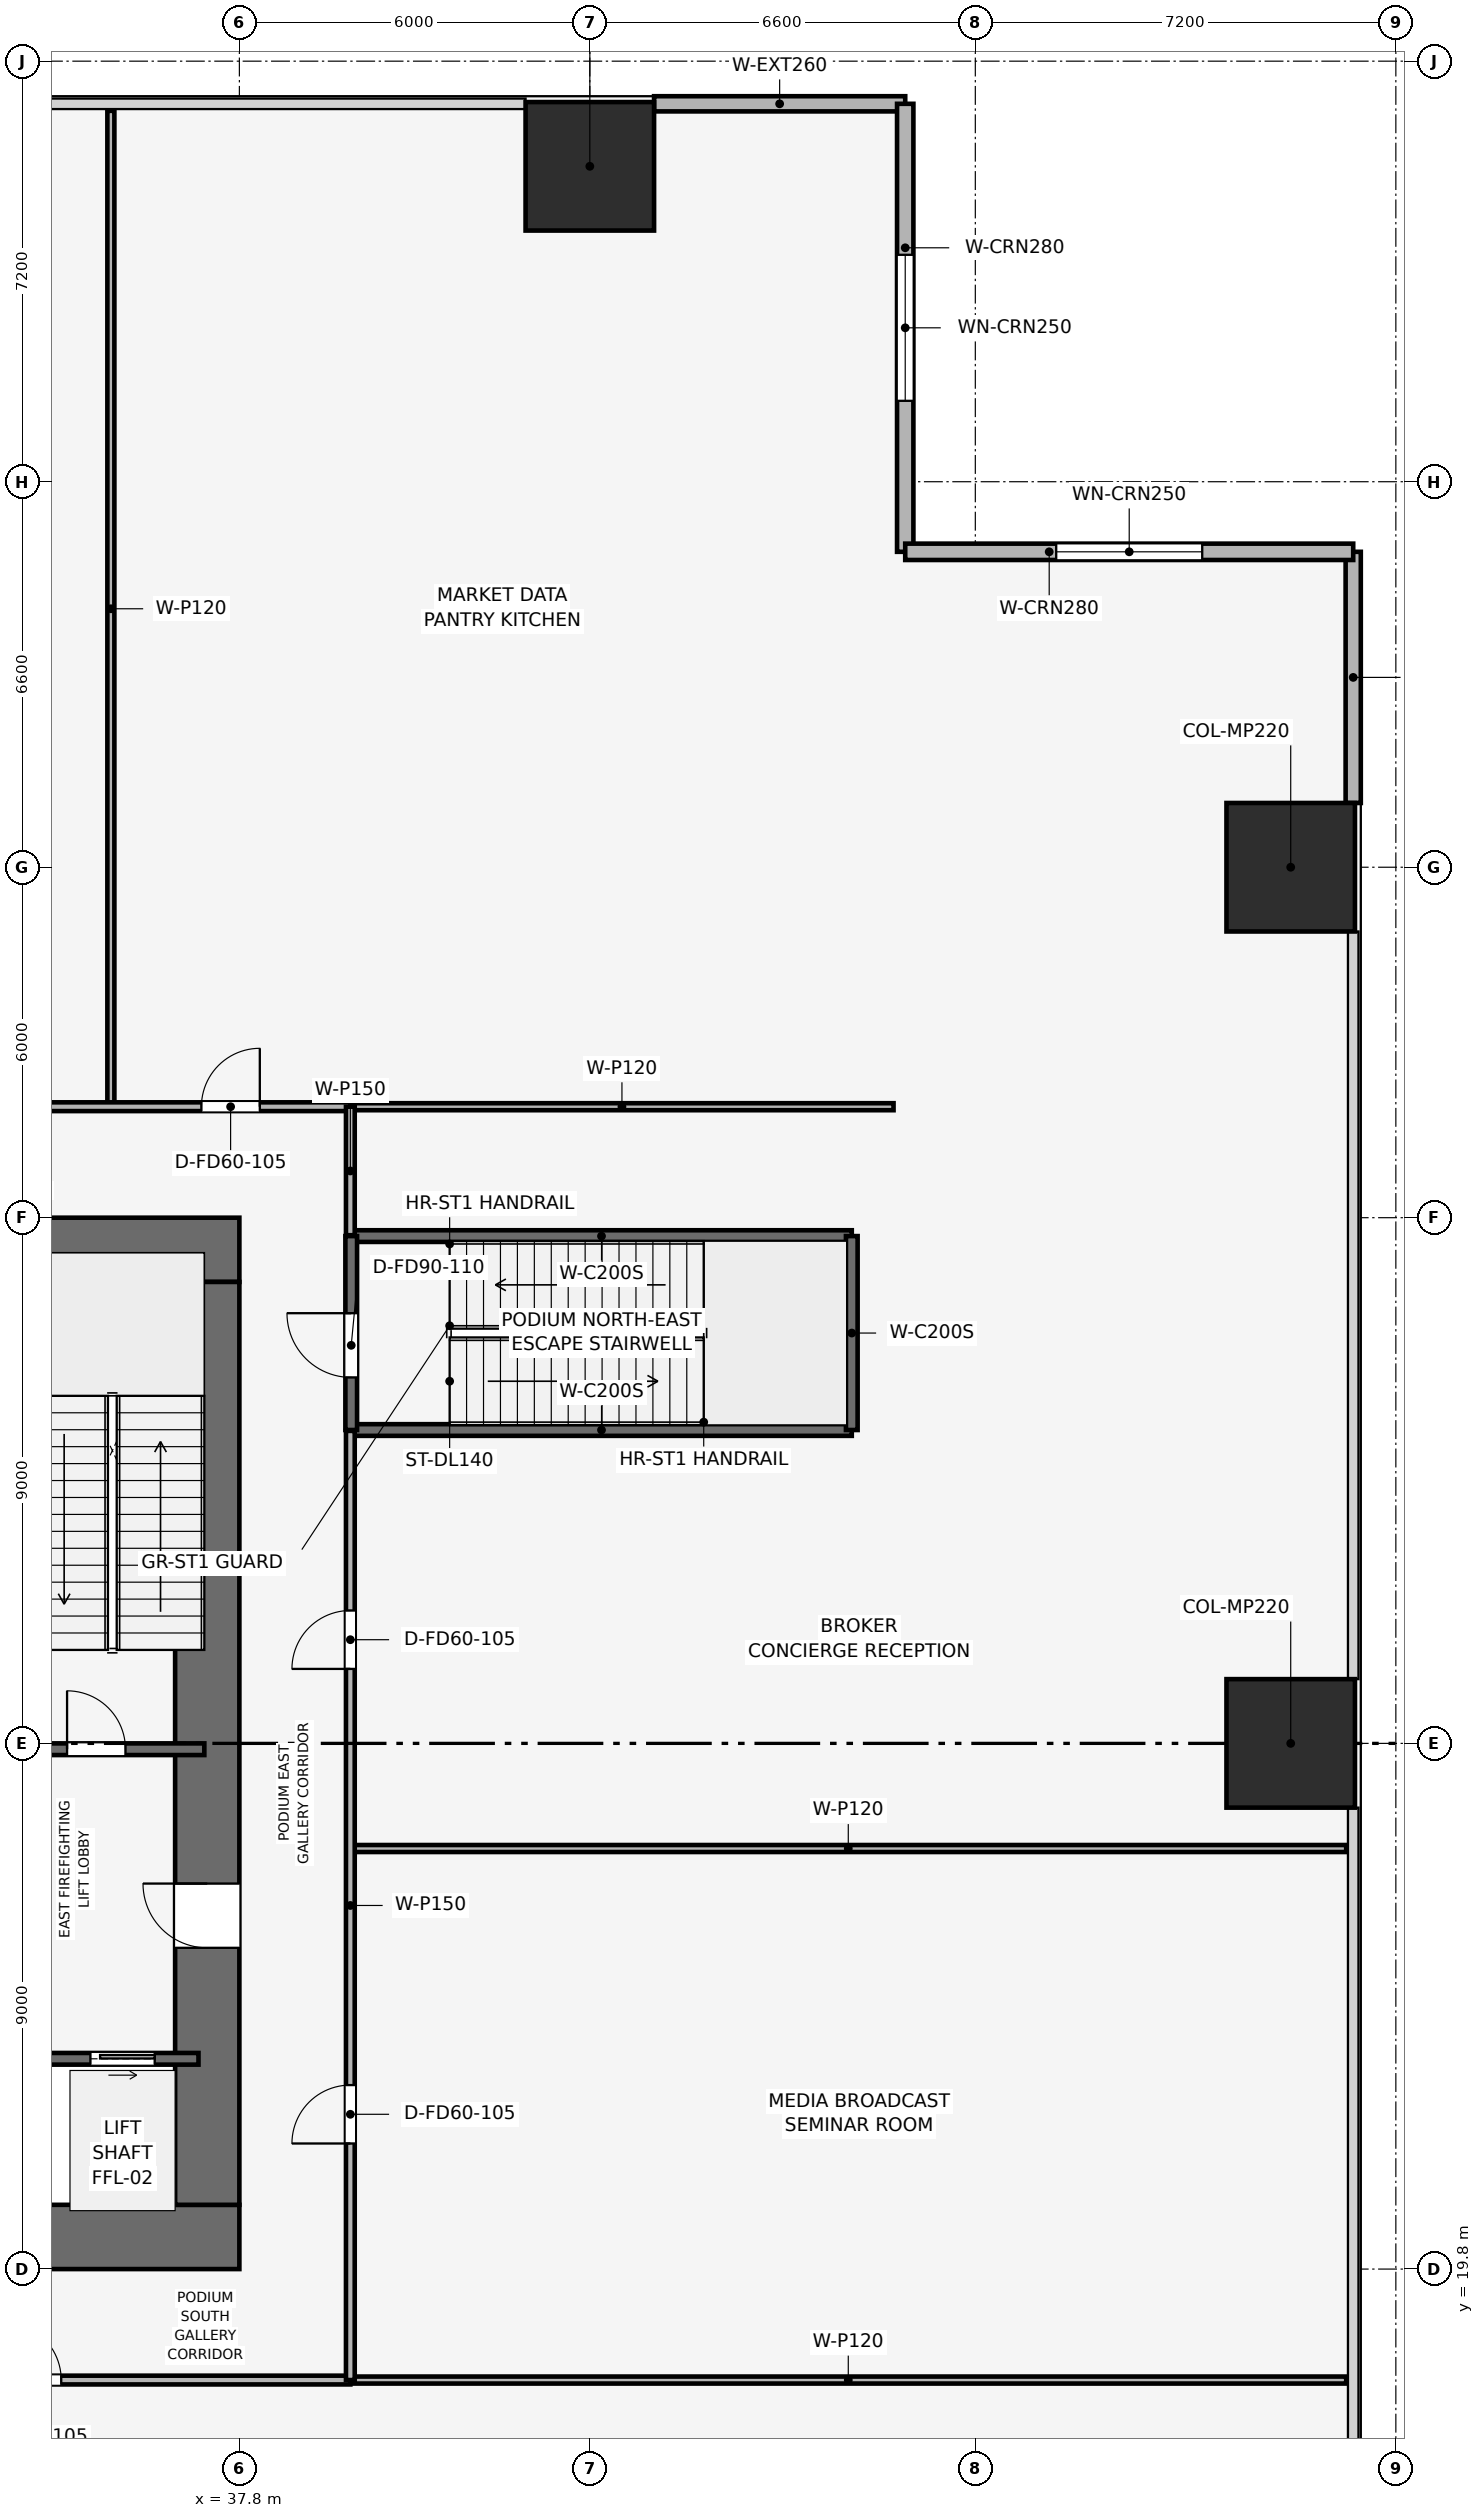
"""IFC4 building model, lengths in metres.
Left out: names, types, materials, properties, quantities, classifications, styles, units other than length and angle.
Written with IfcOpenShell. Run it as: python <this file> out.ifc"""

import sys

from ifc_helpers import new_model, si_unit, direction, frame, frame_2d, origin, origin_2d, place, context, subcontext, project, spatial, rectangle, extrude, element, fill, save


model = new_model("IFC4")
c1 = context("Model", 3, precision=1e-05, world=origin(), true_north=direction((0.0, 1.0)))
c2 = subcontext(c1, "Body", "Model", "MODEL_VIEW")
j1 = project(units=[si_unit("LENGTHUNIT", "METRE"), si_unit("PLANEANGLEUNIT", "RADIAN")], contexts=[c1])
p1 = place(None, origin())
s1 = spatial("IfcSite", under=j1, at=p1, CompositionType="ELEMENT")
p2 = place(p1, origin())
s2 = spatial("IfcBuilding", under=s1, at=p2, CompositionType="ELEMENT")
p3 = place(p2, frame((0.0, 0.0, 8.4)))
s3 = spatial("IfcBuildingStorey", under=s2, at=p3, CompositionType="ELEMENT", Elevation=8.4)
p4 = place(p3, frame((19.8, 20.35, 0.0), z_axis=(0.0, 0.0, 1.0), x_axis=(1.0, 0.0, 0.0)))
e1 = element("IfcWall", 1, at=p4, inside=s3, PredefinedType="SHEAR", context=c2, shape_type="SweptSolid", body=[
    extrude(rectangle(XDim=18.0, YDim=1.1, at=frame_2d((9.0, 0.0))), origin(), (0.0, 0.0, 1.0), 5.4),
])
p5 = place(p4, frame((8.4, 0.0, 0.0)))
e2 = element("IfcOpeningElement", 2, at=p5, cuts=e1, PredefinedType="OPENING", context=c2, shape_type="SweptSolid", body=[
    extrude(rectangle(XDim=1.2, YDim=2.2, at=frame_2d((0.6, 1.1))), frame((0.0, 0.56, 0.0), z_axis=(0.0, -1.0, 0.0), x_axis=(1.0, 0.0, 0.0)), (0.0, 0.0, 1.0), 1.12),
])
p6 = place(p3, frame((19.8, 37.25, 0.0), z_axis=(0.0, 0.0, 1.0), x_axis=(1.0, 0.0, 0.0)))
e3 = element("IfcWall", 3, at=p6, inside=s3, PredefinedType="SHEAR", context=c2, shape_type="SweptSolid", body=[
    extrude(rectangle(XDim=18.0, YDim=1.1, at=frame_2d((9.0, 0.0))), origin(), (0.0, 0.0, 1.0), 5.4),
])
p7 = place(p6, frame((7.05, 0.0, 0.0)))
e4 = element("IfcOpeningElement", 4, at=p7, cuts=e3, PredefinedType="OPENING", context=c2, shape_type="SweptSolid", body=[
    extrude(rectangle(XDim=1.1, YDim=2.15, at=frame_2d((0.55, 1.075))), frame((0.0, 0.56, 0.0), z_axis=(0.0, -1.0, 0.0), x_axis=(1.0, 0.0, 0.0)), (0.0, 0.0, 1.0), 1.12),
])
p8 = place(p3, frame((37.25, 20.9, 0.0), z_axis=(0.0, 0.0, 1.0), x_axis=(0.0, 1.0, 0.0)))
e5 = element("IfcWall", 5, at=p8, inside=s3, PredefinedType="SHEAR", context=c2, shape_type="SweptSolid", body=[
    extrude(rectangle(XDim=15.8, YDim=1.1, at=frame_2d((7.9, 0.0))), origin(), (0.0, 0.0, 1.0), 5.4),
])
p9 = place(p8, frame((4.4, 0.0, 0.0)))
e6 = element("IfcOpeningElement", 6, at=p9, cuts=e5, PredefinedType="OPENING", context=c2, shape_type="SweptSolid", body=[
    extrude(rectangle(XDim=1.1, YDim=2.15, at=frame_2d((0.55, 1.075))), frame((0.0, 0.56, 0.0), z_axis=(0.0, -1.0, 0.0), x_axis=(1.0, 0.0, 0.0)), (0.0, 0.0, 1.0), 1.12),
])
for number, where, z_axis, x_axis in (
    (7, (55.8, 28.8, 0.002), (0.0, 0.0, 1.0), (1.0, 0.0, 0.0)),
    (8, (55.8, 43.8, 0.002), (0.0, 0.0, 1.0), (1.0, 0.0, 0.0)),
    (9, (43.8, 55.8, 0.002), (0.0, 0.0, 1.0), (1.0, 0.0, 0.0)),
):
    element("IfcColumn", number, at=place(p3, frame(where, z_axis=z_axis, x_axis=x_axis)), inside=s3, PredefinedType="PILASTER", context=c2, shape_type="SweptSolid", body=[
        extrude(rectangle(XDim=2.2, YDim=2.2, at=origin_2d()), origin(), (0.0, 0.0, 1.0), 5.396),
    ])
for number, where, z_axis, x_axis in (
    (10, (44.9, 56.87, 0.0), (0.0, 0.0, 1.0), (1.0, 0.0, 0.0)),
    (11, (56.87, 49.2, 0.0), (0.0, 0.0, 1.0), (0.0, -1.0, 0.0)),
):
    element("IfcWall", number, at=place(p3, frame(where, z_axis=z_axis, x_axis=x_axis)), inside=s3, PredefinedType="SOLIDWALL", context=c2, shape_type="SweptSolid", body=[
        extrude(rectangle(XDim=4.3, YDim=0.26, at=frame_2d((2.15, 0.0))), origin(), (0.0, 0.0, 1.0), 5.05),
    ])
p10 = place(p3, frame((49.2, 56.87, 0.0), z_axis=(0.0, 0.0, 1.0), x_axis=(0.0, -1.0, 0.0)))
e12 = element("IfcWall", 12, at=p10, inside=s3, PredefinedType="SOLIDWALL", context=c2, shape_type="SweptSolid", body=[
    extrude(rectangle(XDim=7.67, YDim=0.28, at=frame_2d((3.835, 0.0))), origin(), (0.0, 0.0, 1.0), 5.05),
])
p11 = place(p10, frame((2.585, 0.0, 0.9)))
e13 = element("IfcOpeningElement", 13, at=p11, cuts=e12, PredefinedType="OPENING", context=c2, shape_type="SweptSolid", body=[
    extrude(rectangle(XDim=2.5, YDim=1.9, at=frame_2d((1.25, 0.95))), frame((0.0, 0.15, 0.0), z_axis=(0.0, -1.0, 0.0), x_axis=(1.0, 0.0, 0.0)), (0.0, 0.0, 1.0), 0.3),
])
p12 = place(p3, frame((49.2, 49.2, 0.0), z_axis=(0.0, 0.0, 1.0), x_axis=(1.0, 0.0, 0.0)))
e14 = element("IfcWall", 14, at=p12, inside=s3, PredefinedType="SOLIDWALL", context=c2, shape_type="SweptSolid", body=[
    extrude(rectangle(XDim=7.67, YDim=0.28, at=frame_2d((3.835, 0.0))), origin(), (0.0, 0.0, 1.0), 5.05),
])
p13 = place(p12, frame((2.585, 0.0, 0.9)))
e15 = element("IfcOpeningElement", 15, at=p13, cuts=e14, PredefinedType="OPENING", context=c2, shape_type="SweptSolid", body=[
    extrude(rectangle(XDim=2.5, YDim=1.9, at=frame_2d((1.25, 0.95))), frame((0.0, 0.15, 0.0), z_axis=(0.0, -1.0, 0.0), x_axis=(1.0, 0.0, 0.0)), (0.0, 0.0, 1.0), 0.3),
])
p14 = place(p3, frame((34.05, 28.7, 0.0), z_axis=(0.0, 0.0, 1.0), x_axis=(1.0, 0.0, 0.0)))
e16 = element("IfcWall", 16, at=p14, inside=s3, PredefinedType="SHEAR", context=c2, shape_type="SweptSolid", body=[
    extrude(rectangle(XDim=3.15, YDim=0.2, at=frame_2d((1.575, 0.0))), origin(), (0.0, 0.0, 1.0), 5.05),
])
p15 = place(p14, frame((0.8, 0.0, 0.0)))
e17 = element("IfcOpeningElement", 17, at=p15, cuts=e16, PredefinedType="OPENING", context=c2, shape_type="SweptSolid", body=[
    extrude(rectangle(XDim=1.0, YDim=2.1, at=frame_2d((0.5, 1.05))), frame((0.0, 0.11, 0.0), z_axis=(0.0, -1.0, 0.0), x_axis=(1.0, 0.0, 0.0)), (0.0, 0.0, 1.0), 0.22),
])
p16 = place(p3, frame((34.05, 23.4, 0.0), z_axis=(0.0, 0.0, 1.0), x_axis=(1.0, 0.0, 0.0)))
e18 = element("IfcWall", 18, at=p16, inside=s3, PredefinedType="SHEAR", context=c2, shape_type="SweptSolid", body=[
    extrude(rectangle(XDim=3.05, YDim=0.2, at=frame_2d((1.525, 0.0))), origin(), (0.0, 0.0, 1.0), 5.05),
])
p17 = place(p16, frame((1.2, 0.0, 0.0)))
e19 = element("IfcOpeningElement", 19, at=p17, cuts=e18, PredefinedType="OPENING", context=c2, shape_type="SweptSolid", body=[
    extrude(rectangle(XDim=1.1, YDim=2.15, at=frame_2d((0.55, 1.075))), frame((0.0, 0.11, 0.0), z_axis=(0.0, -1.0, 0.0), x_axis=(1.0, 0.0, 0.0)), (0.0, 0.0, 1.0), 0.22),
])
for number, where, z_axis, x_axis in (
    (20, (39.715, 34.165, 0.0), (0.0, 0.0, 1.0), (1.0, 0.0, 0.0)),
    (21, (39.715, 37.485, 0.0), (0.0, 0.0, 1.0), (1.0, 0.0, 0.0)),
):
    element("IfcWall", number, at=place(p3, frame(where, z_axis=z_axis, x_axis=x_axis)), inside=s3, PredefinedType="SHEAR", context=c2, shape_type="SweptSolid", body=[
        extrude(rectangle(XDim=8.57, YDim=0.2, at=frame_2d((4.285, 0.0))), origin(), (0.0, 0.0, 1.0), 5.398),
    ])
p18 = place(p3, frame((48.285, 34.165, 0.0), z_axis=(0.0, 0.0, 1.0), x_axis=(0.0, 1.0, 0.0)))
e22 = element("IfcWall", 22, at=p18, inside=s3, PredefinedType="SHEAR", context=c2, shape_type="SweptSolid", body=[
    extrude(rectangle(XDim=3.32, YDim=0.2, at=frame_2d((1.66, 0.0))), origin(), (0.0, 0.0, 1.0), 5.398),
])
p19 = place(p3, frame((39.715, 34.165, 0.0), z_axis=(0.0, 0.0, 1.0), x_axis=(0.0, 1.0, 0.0)))
e23 = element("IfcWall", 23, at=p19, inside=s3, PredefinedType="SHEAR", context=c2, shape_type="SweptSolid", body=[
    extrude(rectangle(XDim=3.32, YDim=0.2, at=frame_2d((1.66, 0.0))), origin(), (0.0, 0.0, 1.0), 5.398),
])
p20 = place(p19, frame((0.9, 0.0, 0.0)))
e24 = element("IfcOpeningElement", 24, at=p20, cuts=e23, PredefinedType="OPENING", context=c2, shape_type="SweptSolid", body=[
    extrude(rectangle(XDim=1.1, YDim=2.15, at=frame_2d((0.55, 1.075))), frame((0.0, 0.11, 0.0), z_axis=(0.0, -1.0, 0.0), x_axis=(1.0, 0.0, 0.0)), (0.0, 0.0, 1.0), 0.22),
])
for number, where, z_axis, x_axis in (
    (25, (35.6, 39.7, 0.0), (0.0, 0.0, 1.0), (0.0, 1.0, 0.0)),
    (26, (39.7, 27.0, 0.0), (0.0, 0.0, 1.0), (1.0, 0.0, 0.0)),
    (27, (39.7, 17.9, 0.0), (0.0, 0.0, 1.0), (1.0, 0.0, 0.0)),
):
    element("IfcWall", number, at=place(p3, frame(where, z_axis=z_axis, x_axis=x_axis)), inside=s3, PredefinedType="PARTITIONING", context=c2, shape_type="SweptSolid", body=[
        extrude(rectangle(XDim=17.05, YDim=0.12, at=frame_2d((8.525, 0.0))), origin(), (0.0, 0.0, 1.0), 4.035),
    ])
p21 = place(p3, frame((39.7, 39.7, 0.0), z_axis=(0.0, 0.0, 1.0), x_axis=(1.0, 0.0, 0.0)))
e28 = element("IfcWall", 28, at=p21, inside=s3, PredefinedType="PARTITIONING", context=c2, shape_type="SweptSolid", body=[
    extrude(rectangle(XDim=9.3, YDim=0.12, at=frame_2d((4.65, 0.0))), origin(), (0.0, 0.0, 1.0), 5.05),
])
p22 = place(p3, frame((17.9, 17.9, 0.0), z_axis=(0.0, 0.0, 1.0), x_axis=(1.0, 0.0, 0.0)))
e29 = element("IfcWall", 29, at=p22, inside=s3, PredefinedType="PARTITIONING", context=c2, shape_type="SweptSolid", body=[
    extrude(rectangle(XDim=21.8, YDim=0.15, at=frame_2d((10.9, 0.0))), origin(), (0.0, 0.0, 1.0), 4.135),
])
p23 = place(p22, frame((4.95, 0.0, 0.0)))
e30 = element("IfcOpeningElement", 30, at=p23, cuts=e29, PredefinedType="OPENING", context=c2, shape_type="SweptSolid", body=[
    extrude(rectangle(XDim=1.0, YDim=2.15, at=frame_2d((0.5, 1.075))), frame((0.0, 0.085, 0.0), z_axis=(0.0, -1.0, 0.0), x_axis=(1.0, 0.0, 0.0)), (0.0, 0.0, 1.0), 0.17),
])
p24 = place(p22, frame((15.85, 0.0, 0.0)))
e31 = element("IfcOpeningElement", 31, at=p24, cuts=e29, PredefinedType="OPENING", context=c2, shape_type="SweptSolid", body=[
    extrude(rectangle(XDim=1.0, YDim=2.15, at=frame_2d((0.5, 1.075))), frame((0.0, 0.085, 0.0), z_axis=(0.0, -1.0, 0.0), x_axis=(1.0, 0.0, 0.0)), (0.0, 0.0, 1.0), 0.17),
])
p25 = place(p3, frame((17.9, 39.7, 0.0), z_axis=(0.0, 0.0, 1.0), x_axis=(1.0, 0.0, 0.0)))
e32 = element("IfcWall", 32, at=p25, inside=s3, PredefinedType="PARTITIONING", context=c2, shape_type="SweptSolid", body=[
    extrude(rectangle(XDim=21.8, YDim=0.15, at=frame_2d((10.9, 0.0))), origin(), (0.0, 0.0, 1.0), 4.135),
])
p26 = place(p25, frame((1.55, 0.0, 0.0)))
e33 = element("IfcOpeningElement", 33, at=p26, cuts=e32, PredefinedType="OPENING", context=c2, shape_type="SweptSolid", body=[
    extrude(rectangle(XDim=1.0, YDim=2.15, at=frame_2d((0.5, 1.075))), frame((0.0, 0.085, 0.0), z_axis=(0.0, -1.0, 0.0), x_axis=(1.0, 0.0, 0.0)), (0.0, 0.0, 1.0), 0.17),
])
p27 = place(p25, frame((10.4, 0.0, 0.0)))
e34 = element("IfcOpeningElement", 34, at=p27, cuts=e32, PredefinedType="OPENING", context=c2, shape_type="SweptSolid", body=[
    extrude(rectangle(XDim=1.0, YDim=2.15, at=frame_2d((0.5, 1.075))), frame((0.0, 0.085, 0.0), z_axis=(0.0, -1.0, 0.0), x_axis=(1.0, 0.0, 0.0)), (0.0, 0.0, 1.0), 0.17),
])
p28 = place(p25, frame((19.25, 0.0, 0.0)))
e35 = element("IfcOpeningElement", 35, at=p28, cuts=e32, PredefinedType="OPENING", context=c2, shape_type="SweptSolid", body=[
    extrude(rectangle(XDim=1.0, YDim=2.15, at=frame_2d((0.5, 1.075))), frame((0.0, 0.085, 0.0), z_axis=(0.0, -1.0, 0.0), x_axis=(1.0, 0.0, 0.0)), (0.0, 0.0, 1.0), 0.17),
])
p29 = place(p3, frame((39.7, 17.9, 0.0), z_axis=(0.0, 0.0, 1.0), x_axis=(0.0, 1.0, 0.0)))
e36 = element("IfcWall", 36, at=p29, inside=s3, PredefinedType="PARTITIONING", context=c2, shape_type="SweptSolid", body=[
    extrude(rectangle(XDim=16.25, YDim=0.15, at=frame_2d((8.125, 0.0))), origin(), (0.0, 0.0, 1.0), 4.135),
])
p30 = place(p29, frame((4.05, 0.0, 0.0)))
e37 = element("IfcOpeningElement", 37, at=p30, cuts=e36, PredefinedType="OPENING", context=c2, shape_type="SweptSolid", body=[
    extrude(rectangle(XDim=1.0, YDim=2.15, at=frame_2d((0.5, 1.075))), frame((0.0, 0.085, 0.0), z_axis=(0.0, -1.0, 0.0), x_axis=(1.0, 0.0, 0.0)), (0.0, 0.0, 1.0), 0.17),
])
p31 = place(p29, frame((12.175, 0.0, 0.0)))
e38 = element("IfcOpeningElement", 38, at=p31, cuts=e36, PredefinedType="OPENING", context=c2, shape_type="SweptSolid", body=[
    extrude(rectangle(XDim=1.0, YDim=2.15, at=frame_2d((0.5, 1.075))), frame((0.0, 0.085, 0.0), z_axis=(0.0, -1.0, 0.0), x_axis=(1.0, 0.0, 0.0)), (0.0, 0.0, 1.0), 0.17),
])
p32 = place(p3, frame((39.7, 37.5, 0.0), z_axis=(0.0, 0.0, 1.0), x_axis=(0.0, 1.0, 0.0)))
e39 = element("IfcWall", 39, at=p32, inside=s3, PredefinedType="PARTITIONING", context=c2, shape_type="SweptSolid", body=[
    extrude(rectangle(XDim=2.2, YDim=0.15, at=frame_2d((1.1, 0.0))), origin(), (0.0, 0.0, 1.0), 5.05),
])
p33 = place(p11, origin())
e40 = element("IfcWindow", 40, at=p33, inside=s3, PartitioningType="SINGLE_PANEL", PredefinedType="WINDOW", context=c2, shape_type="SweptSolid", body=[
    extrude(rectangle(XDim=2.5, YDim=1.9, at=frame_2d((1.25, 0.95))), frame((0.0, 0.03, 0.0), z_axis=(0.0, -1.0, 0.0), x_axis=(1.0, 0.0, 0.0)), (0.0, 0.0, 1.0), 0.06),
])
fill(e13, e40)
p34 = place(p13, origin())
e41 = element("IfcWindow", 41, at=p34, inside=s3, PartitioningType="SINGLE_PANEL", PredefinedType="WINDOW", context=c2, shape_type="SweptSolid", body=[
    extrude(rectangle(XDim=2.5, YDim=1.9, at=frame_2d((1.25, 0.95))), frame((0.0, 0.03, 0.0), z_axis=(0.0, -1.0, 0.0), x_axis=(1.0, 0.0, 0.0)), (0.0, 0.0, 1.0), 0.06),
])
fill(e15, e41)
p35 = place(p15, origin())
e42 = element("IfcDoor", 42, at=p35, inside=s3, OperationType="SINGLE_SWING_LEFT", PredefinedType="DOOR", context=c2, shape_type="SweptSolid", body=[
    extrude(rectangle(XDim=1.0, YDim=2.1, at=frame_2d((0.5, 1.05))), frame((0.0, 0.025, 0.0), z_axis=(0.0, -1.0, 0.0), x_axis=(1.0, 0.0, 0.0)), (0.0, 0.0, 1.0), 0.05),
])
fill(e17, e42)
p36 = place(p17, origin())
e43 = element("IfcDoor", 43, at=p36, inside=s3, OperationType="SLIDING_TO_RIGHT", PredefinedType="DOOR", context=c2, shape_type="SweptSolid", body=[
    extrude(rectangle(XDim=1.1, YDim=2.15, at=frame_2d((0.55, 1.075))), frame((0.0, 0.025, 0.0), z_axis=(0.0, -1.0, 0.0), x_axis=(1.0, 0.0, 0.0)), (0.0, 0.0, 1.0), 0.05),
])
fill(e19, e43)
p37 = place(p20, origin())
e44 = element("IfcDoor", 44, at=p37, inside=s3, OperationType="SINGLE_SWING_RIGHT", PredefinedType="DOOR", context=c2, shape_type="SweptSolid", body=[
    extrude(rectangle(XDim=1.1, YDim=2.15, at=frame_2d((0.55, 1.075))), frame((0.0, 0.025, 0.0), z_axis=(0.0, -1.0, 0.0), x_axis=(1.0, 0.0, 0.0)), (0.0, 0.0, 1.0), 0.05),
])
fill(e24, e44)
p38 = place(p24, origin())
e45 = element("IfcDoor", 45, at=p38, inside=s3, OperationType="SINGLE_SWING_LEFT", PredefinedType="DOOR", context=c2, shape_type="SweptSolid", body=[
    extrude(rectangle(XDim=1.0, YDim=2.15, at=frame_2d((0.5, 1.075))), frame((0.0, 0.025, 0.0), z_axis=(0.0, -1.0, 0.0), x_axis=(1.0, 0.0, 0.0)), (0.0, 0.0, 1.0), 0.05),
])
fill(e31, e45)
p39 = place(p28, origin())
e46 = element("IfcDoor", 46, at=p39, inside=s3, OperationType="SINGLE_SWING_RIGHT", PredefinedType="DOOR", context=c2, shape_type="SweptSolid", body=[
    extrude(rectangle(XDim=1.0, YDim=2.15, at=frame_2d((0.5, 1.075))), frame((0.0, 0.025, 0.0), z_axis=(0.0, -1.0, 0.0), x_axis=(1.0, 0.0, 0.0)), (0.0, 0.0, 1.0), 0.05),
])
fill(e35, e46)
p40 = place(p30, origin())
e47 = element("IfcDoor", 47, at=p40, inside=s3, OperationType="SINGLE_SWING_LEFT", PredefinedType="DOOR", context=c2, shape_type="SweptSolid", body=[
    extrude(rectangle(XDim=1.0, YDim=2.15, at=frame_2d((0.5, 1.075))), frame((0.0, 0.025, 0.0), z_axis=(0.0, -1.0, 0.0), x_axis=(1.0, 0.0, 0.0)), (0.0, 0.0, 1.0), 0.05),
])
fill(e37, e47)
p41 = place(p31, origin())
e48 = element("IfcDoor", 48, at=p41, inside=s3, OperationType="SINGLE_SWING_LEFT", PredefinedType="DOOR", context=c2, shape_type="SweptSolid", body=[
    extrude(rectangle(XDim=1.0, YDim=2.15, at=frame_2d((0.5, 1.075))), frame((0.0, 0.025, 0.0), z_axis=(0.0, -1.0, 0.0), x_axis=(1.0, 0.0, 0.0)), (0.0, 0.0, 1.0), 0.05),
])
fill(e38, e48)
p42 = place(p9, origin())
e49 = element("IfcDoor", 49, at=p42, inside=s3, OperationType="SINGLE_SWING_RIGHT", PredefinedType="DOOR", context=c2, shape_type="SweptSolid", body=[
    extrude(rectangle(XDim=1.1, YDim=2.15, at=frame_2d((0.55, 1.075))), frame((0.0, 0.025, 0.0), z_axis=(0.0, -1.0, 0.0), x_axis=(1.0, 0.0, 0.0)), (0.0, 0.0, 1.0), 0.05),
])
fill(e6, e49)
save(model, sys.argv[1])
